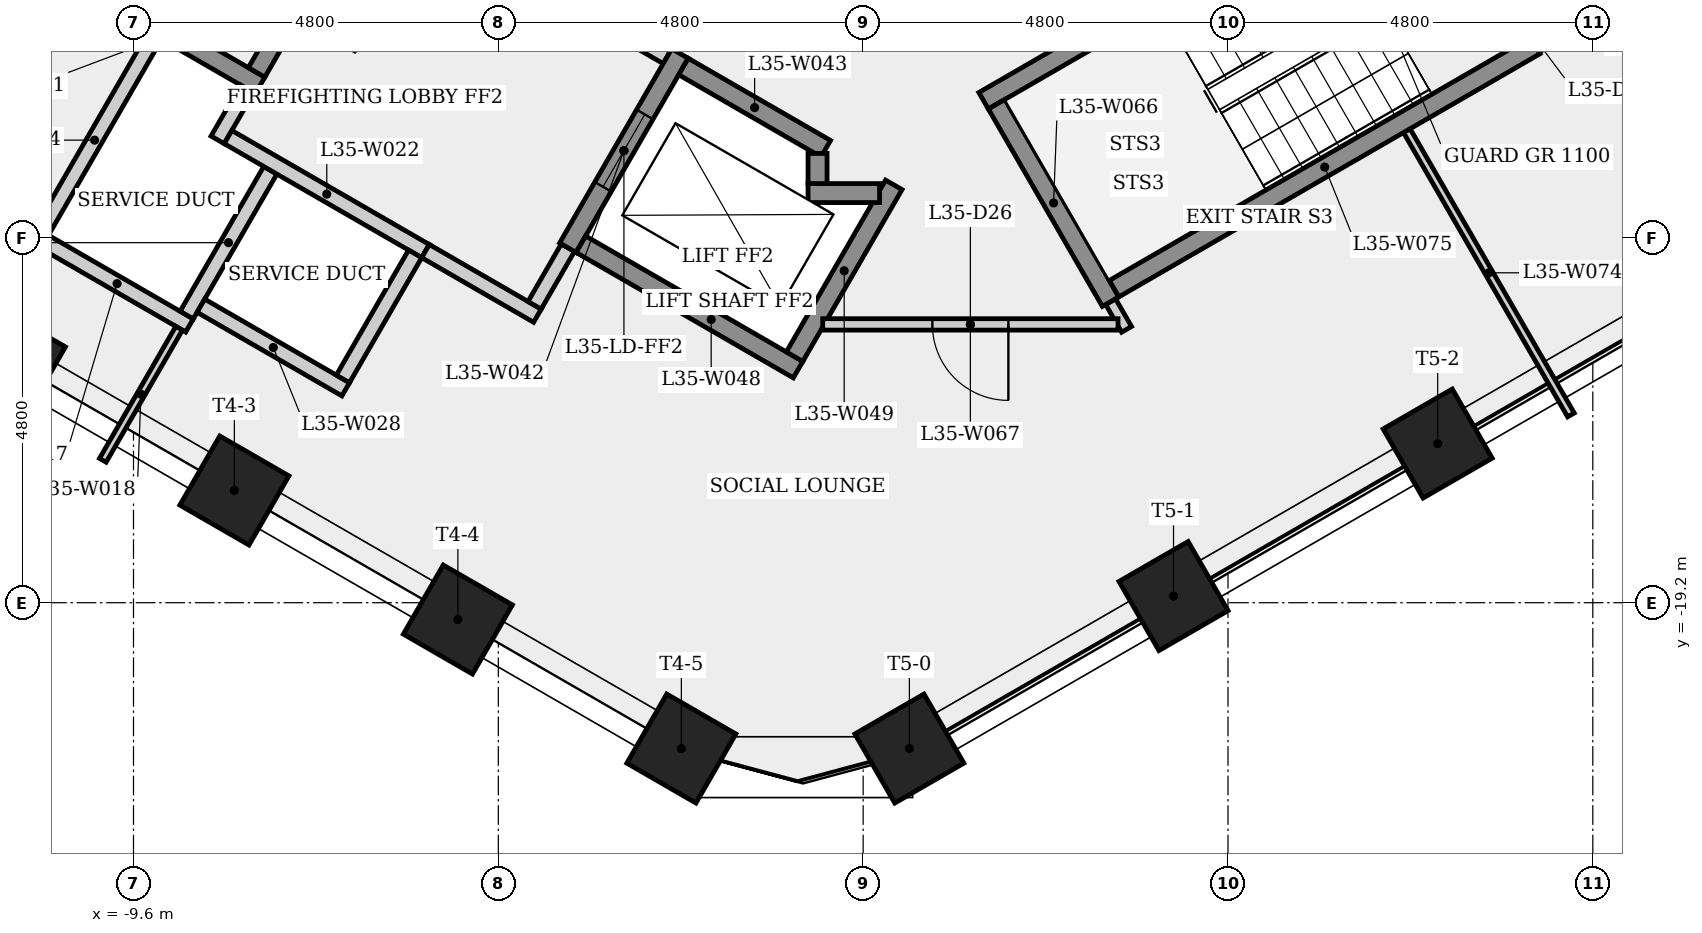
"""IFC4 building model, lengths in metres.
Left out: names, types, materials, properties, quantities, classifications, styles, units other than length and angle.
Written with IfcOpenShell. Run it as: python <this file> out.ifc"""

import sys

from ifc_helpers import new_model, si_unit, direction, frame, frame_2d, origin, origin_2d, place, context, subcontext, project, spatial, rectangle, extrude, element, fill, save


model = new_model("IFC4")
c1 = context("Model", 3, precision=1e-05, world=origin(), true_north=direction((0.0, 1.0)))
c2 = subcontext(c1, "Body", "Model", "MODEL_VIEW")
j1 = project(units=[si_unit("LENGTHUNIT", "METRE"), si_unit("PLANEANGLEUNIT", "RADIAN")], contexts=[c1])
p1 = place(None, origin())
s1 = spatial("IfcSite", under=j1, at=p1, CompositionType="ELEMENT")
p2 = place(p1, origin())
s2 = spatial("IfcBuilding", under=s1, at=p2, CompositionType="ELEMENT")
p3 = place(p2, frame((0.0, 0.0, 132.5)))
s3 = spatial("IfcBuildingStorey", under=s2, at=p3, CompositionType="ELEMENT", Elevation=132.5)
for number, where, z_axis, x_axis in (
    (1, (-11.213, -16.026, 0.0), (0.0, 0.0, 1.0), (-0.5, -0.866, 0.0)),
    (2, (-8.273, -17.724, 0.0), (0.0, 0.0, 1.0), (-0.5, -0.866, 0.0)),
    (3, (-5.332, -19.421, 0.0), (0.0, 0.0, 1.0), (-0.5, -0.866, 0.0)),
    (4, (-2.392, -21.119, 0.0), (0.0, 0.0, 1.0), (-0.5, -0.866, 0.0)),
    (5, (0.608, -21.119, 0.0), (0.0, 0.0, 1.0), (0.5, -0.866, 0.0)),
    (6, (4.083, -19.112, 0.0), (0.0, 0.0, 1.0), (0.5, -0.866, 0.0)),
    (7, (7.559, -17.106, 0.0), (0.0, 0.0, 1.0), (0.5, -0.866, 0.0)),
):
    element("IfcColumn", number, at=place(p3, frame(where, z_axis=z_axis, x_axis=x_axis)), inside=s3, PredefinedType="COLUMN", context=c2, shape_type="SweptSolid", body=[
        extrude(rectangle(XDim=1.05, YDim=1.05, at=origin_2d()), origin(), (0.0, 0.0, 1.0), 3.4),
    ])
p4 = place(p3, frame((-10.905, -14.489, 0.0), z_axis=(0.0, 0.0, 1.0), x_axis=(0.499959856469, 0.866048579423, 0.0)))
e8 = element("IfcWall", 8, at=p4, inside=s3, PredefinedType="PLUMBINGWALL", context=c2, shape_type="SweptSolid", body=[
    extrude(rectangle(XDim=3.175, YDim=0.2, at=frame_2d((1.587, 0.0))), origin(), (0.0, 0.0, 1.0), 3.0),
])
p5 = place(p3, frame((-13.477, -9.193, 0.0), z_axis=(0.0, 0.0, 1.0), x_axis=(0.866025499775, -0.499999833739, 0.0)))
e9 = element("IfcWall", 9, at=p5, inside=s3, PredefinedType="SHEAR", context=c2, shape_type="SweptSolid", body=[
    extrude(rectangle(XDim=6.4, YDim=0.25, at=frame_2d((3.2, 0.0))), origin(), (0.0, 0.0, 1.0), 3.0),
])
p6 = place(p3, frame((-8.863, -15.552, 0.0), z_axis=(0.0, 0.0, 1.0), x_axis=(-0.866035918664, 0.499981787252, 0.0)))
e10 = element("IfcWall", 10, at=p6, inside=s3, PredefinedType="PLUMBINGWALL", context=c2, shape_type="SweptSolid", body=[
    extrude(rectangle(XDim=2.2, YDim=0.2, at=frame_2d((1.1, 0.0))), origin(), (0.0, 0.0, 1.0), 3.0),
])
p7 = place(p3, frame((-9.0, -15.588, 0.0), z_axis=(0.0, 0.0, 1.0), x_axis=(-0.500038395149, -0.8660032352, 0.0)))
e11 = element("IfcWall", 11, at=p7, inside=s3, PredefinedType="PARTITIONING", context=c2, shape_type="SweptSolid", body=[
    extrude(rectangle(XDim=2.007, YDim=0.1, at=frame_2d((1.003, 0.0))), origin(), (0.0, 0.0, 1.0), 3.0),
])
p8 = place(p3, frame((-8.9, -15.415, 0.0), z_axis=(0.0, 0.0, 1.0), x_axis=(0.499946605688, 0.86605622881, 0.0)))
e12 = element("IfcWall", 12, at=p8, inside=s3, PredefinedType="PLUMBINGWALL", context=c2, shape_type="SweptSolid", body=[
    extrude(rectangle(XDim=2.2, YDim=0.2, at=frame_2d((1.1, 0.0))), origin(), (0.0, 0.0, 1.0), 3.0),
])
p9 = place(p3, frame((-8.493, -13.11, 0.0), z_axis=(0.0, 0.0, 1.0), x_axis=(0.500067724834, 0.865986299303, 0.0)))
e13 = element("IfcWall", 13, at=p9, inside=s3, PredefinedType="PLUMBINGWALL", context=c2, shape_type="SweptSolid", body=[
    extrude(rectangle(XDim=0.775, YDim=0.2, at=frame_2d((0.388, 0.0))), origin(), (0.0, 0.0, 1.0), 3.0),
])
p10 = place(p3, frame((-8.356, -13.073, 0.0), z_axis=(0.0, 0.0, 1.0), x_axis=(0.866031096941, -0.499990139034, 0.0)))
e14 = element("IfcWall", 14, at=p10, inside=s3, PredefinedType="PLUMBINGWALL", context=c2, shape_type="SweptSolid", body=[
    extrude(rectangle(XDim=3.0, YDim=0.2, at=frame_2d((1.5, 0.0))), origin(), (0.0, 0.0, 1.0), 3.0),
])
p11 = place(p3, frame((-6.808, -16.392, 0.0), z_axis=(0.0, 0.0, 1.0), x_axis=(-0.866008176907, 0.50002983664, 0.0)))
e15 = element("IfcWall", 15, at=p11, inside=s3, PredefinedType="PLUMBINGWALL", context=c2, shape_type="SweptSolid", body=[
    extrude(rectangle(XDim=2.2, YDim=0.2, at=frame_2d((1.1, 0.0))), origin(), (0.0, 0.0, 1.0), 3.0),
])
p12 = place(p3, frame((-6.605, -9.841, 0.0), z_axis=(0.0, 0.0, 1.0), x_axis=(-0.499996545922, -0.866027397988, 0.0)))
e16 = element("IfcWall", 16, at=p12, inside=s3, PredefinedType="SHEAR", context=c2, shape_type="SweptSolid", body=[
    extrude(rectangle(XDim=2.75, YDim=0.25, at=frame_2d((1.375, 0.0))), origin(), (0.0, 0.0, 1.0), 3.0),
])
p13 = place(p12, frame((0.875, 0.0, 0.0)))
e17 = element("IfcOpeningElement", 17, at=p13, cuts=e16, PredefinedType="OPENING", context=c2, shape_type="SweptSolid", body=[
    extrude(rectangle(XDim=1.0, YDim=2.1, at=frame_2d((0.5, 1.05))), frame((0.0, 0.135, 0.0), z_axis=(0.0, -1.0, 0.0), x_axis=(1.0, 0.0, 0.0)), (0.0, 0.0, 1.0), 0.27),
])
p14 = place(p3, frame((-6.435, -9.795, 0.0), z_axis=(0.0, 0.0, 1.0), x_axis=(0.866012907634, -0.500021643343, 0.0)))
e18 = element("IfcWall", 18, at=p14, inside=s3, PredefinedType="PARTITIONING", context=c2, shape_type="SweptSolid", body=[
    extrude(rectangle(XDim=4.45, YDim=0.2, at=frame_2d((2.225, 0.0))), origin(), (0.0, 0.0, 1.0), 3.0),
])
p15 = place(p14, frame((1.675, 0.0, 0.0)))
e19 = element("IfcOpeningElement", 19, at=p15, cuts=e18, PredefinedType="OPENING", context=c2, shape_type="SweptSolid", body=[
    extrude(rectangle(XDim=1.1, YDim=2.1, at=frame_2d((0.55, 1.05))), frame((0.0, 0.11, 0.0), z_axis=(0.0, -1.0, 0.0), x_axis=(1.0, 0.0, 0.0)), (0.0, 0.0, 1.0), 0.22),
])
p16 = place(p3, frame((-5.895, -14.61, 0.0), z_axis=(0.0, 0.0, 1.0), x_axis=(-0.500022797313, -0.86601224135, 0.0)))
e20 = element("IfcWall", 20, at=p16, inside=s3, PredefinedType="PLUMBINGWALL", context=c2, shape_type="SweptSolid", body=[
    extrude(rectangle(XDim=1.9, YDim=0.2, at=frame_2d((0.95, 0.0))), origin(), (0.0, 0.0, 1.0), 3.0),
])
p17 = place(p3, frame((-4.286, -15.423, 0.0), z_axis=(0.0, 0.0, 1.0), x_axis=(-0.866025371046, 0.500000056704, 0.0)))
e21 = element("IfcWall", 21, at=p17, inside=s3, PredefinedType="PARTITIONING", context=c2, shape_type="SweptSolid", body=[
    extrude(rectangle(XDim=1.7, YDim=0.2, at=frame_2d((0.85, 0.0))), origin(), (0.0, 0.0, 1.0), 3.0),
])
p18 = place(p3, frame((-3.885, -14.529, 0.0), z_axis=(0.0, 0.0, 1.0), x_axis=(-0.499859285417, -0.866106630146, 0.0)))
e22 = element("IfcWall", 22, at=p18, inside=s3, PredefinedType="PARTITIONING", context=c2, shape_type="SweptSolid", body=[
    extrude(rectangle(XDim=0.875, YDim=0.2, at=frame_2d((0.438, 0.0))), origin(), (0.0, 0.0, 1.0), 3.0),
])
p19 = place(p3, frame((-2.41, -11.974, 0.0), z_axis=(0.0, 0.0, 1.0), x_axis=(-0.500001826776, -0.866024349092, 0.0)))
e23 = element("IfcWall", 23, at=p19, inside=s3, PredefinedType="SHEAR", context=c2, shape_type="SweptSolid", body=[
    extrude(rectangle(XDim=2.95, YDim=0.25, at=frame_2d((1.475, 0.0))), origin(), (0.0, 0.0, 1.0), 3.0),
])
p20 = place(p19, frame((0.925, 0.0, 0.0)))
e24 = element("IfcOpeningElement", 24, at=p20, cuts=e23, PredefinedType="OPENING", context=c2, shape_type="SweptSolid", body=[
    extrude(rectangle(XDim=1.1, YDim=2.1, at=frame_2d((0.55, 1.05))), frame((0.0, 0.135, 0.0), z_axis=(0.0, -1.0, 0.0), x_axis=(1.0, 0.0, 0.0)), (0.0, 0.0, 1.0), 0.27),
])
p21 = place(p3, frame((-2.364, -12.145, 0.0), z_axis=(0.0, 0.0, 1.0), x_axis=(0.86603892542, -0.499976579108, 0.0)))
e25 = element("IfcWall", 25, at=p21, inside=s3, PredefinedType="SHEAR", context=c2, shape_type="SweptSolid", body=[
    extrude(rectangle(XDim=2.162, YDim=0.25, at=frame_2d((1.081, 0.0))), origin(), (0.0, 0.0, 1.0), 3.0),
])
p22 = place(p3, frame((-0.856, -16.133, 0.0), z_axis=(0.0, 0.0, 1.0), x_axis=(-0.866021716278, 0.500006386895, 0.0)))
e26 = element("IfcWall", 26, at=p22, inside=s3, PredefinedType="SHEAR", context=c2, shape_type="SweptSolid", body=[
    extrude(rectangle(XDim=3.3, YDim=0.25, at=frame_2d((1.65, 0.0))), origin(), (0.0, 0.0, 1.0), 3.0),
])
p23 = place(p3, frame((-0.902, -15.962, 0.0), z_axis=(0.0, 0.0, 1.0), x_axis=(0.499981517636, 0.866036074319, 0.0)))
e27 = element("IfcWall", 27, at=p23, inside=s3, PredefinedType="SHEAR", context=c2, shape_type="SweptSolid", body=[
    extrude(rectangle(XDim=2.61, YDim=0.25, at=frame_2d((1.305, 0.0))), origin(), (0.0, 0.0, 1.0), 3.0),
])
p24 = place(p3, frame((-0.725, -13.81, 0.0), z_axis=(0.0, 0.0, 1.0), x_axis=(1.0, 0.0, 0.0)))
e28 = element("IfcWall", 28, at=p24, inside=s3, PredefinedType="SHEAR", context=c2, shape_type="SweptSolid", body=[
    extrude(rectangle(XDim=0.941, YDim=0.25, at=frame_2d((0.47, 0.0))), origin(), (0.0, 0.0, 1.0), 3.4),
])
p25 = place(p3, frame((-0.6, -13.289, 0.0), z_axis=(0.0, 0.0, 1.0), x_axis=(0.0, -1.0, 0.0)))
e29 = element("IfcWall", 29, at=p25, inside=s3, PredefinedType="SHEAR", context=c2, shape_type="SweptSolid", body=[
    extrude(rectangle(XDim=0.396, YDim=0.25, at=frame_2d((0.198, 0.0))), origin(), (0.0, 0.0, 1.0), 3.4),
])
p26 = place(p3, frame((1.585, -12.595, 0.0), z_axis=(0.0, 0.0, 1.0), x_axis=(0.866036417653, 0.499980922934, 0.0)))
e30 = element("IfcWall", 30, at=p26, inside=s3, PredefinedType="SHEAR", context=c2, shape_type="SweptSolid", body=[
    extrude(rectangle(XDim=6.65, YDim=0.25, at=frame_2d((3.325, 0.0))), origin(), (0.0, 0.0, 1.0), 3.0),
])
p27 = place(p26, frame((5.275, 0.0, 0.0)))
e31 = element("IfcOpeningElement", 31, at=p27, cuts=e30, PredefinedType="OPENING", context=c2, shape_type="SweptSolid", body=[
    extrude(rectangle(XDim=1.0, YDim=2.1, at=frame_2d((0.5, 1.05))), frame((0.0, 0.135, 0.0), z_axis=(0.0, -1.0, 0.0), x_axis=(1.0, 0.0, 0.0)), (0.0, 0.0, 1.0), 0.27),
])
p28 = place(p3, frame((3.256, -15.239, 0.0), z_axis=(0.0, 0.0, 1.0), x_axis=(0.499822960955, -0.8661275932, 0.0)))
e32 = element("IfcWall", 32, at=p28, inside=s3, PredefinedType="PARTITIONING", context=c2, shape_type="SweptSolid", body=[
    extrude(rectangle(XDim=0.421, YDim=0.15, at=frame_2d((0.21, 0.0))), origin(), (0.0, 0.0, 1.0), 3.0),
])
p29 = place(p3, frame((3.256, -15.239, 0.0), z_axis=(0.0, 0.0, 1.0), x_axis=(-0.50002537861, 0.866010750942, 0.0)))
e33 = element("IfcWall", 33, at=p29, inside=s3, PredefinedType="SHEAR", context=c2, shape_type="SweptSolid", body=[
    extrude(rectangle(XDim=3.0, YDim=0.25, at=frame_2d((1.5, 0.0))), origin(), (0.0, 0.0, 1.0), 3.0),
])
p30 = place(p3, frame((3.353, -15.538, 0.0), z_axis=(0.0, 0.0, 1.0), x_axis=(-1.0, 0.0, 0.0)))
e34 = element("IfcWall", 34, at=p30, inside=s3, PredefinedType="PARTITIONING", context=c2, shape_type="SweptSolid", body=[
    extrude(rectangle(XDim=3.885, YDim=0.15, at=frame_2d((1.943, 0.0))), origin(), (0.0, 0.0, 1.0), 3.0),
])
p31 = place(p30, frame((1.443, 0.0, 0.0)))
e35 = element("IfcOpeningElement", 35, at=p31, cuts=e34, PredefinedType="OPENING", context=c2, shape_type="SweptSolid", body=[
    extrude(rectangle(XDim=1.0, YDim=2.1, at=frame_2d((0.5, 1.05))), frame((0.0, 0.085, 0.0), z_axis=(0.0, -1.0, 0.0), x_axis=(1.0, 0.0, 0.0)), (0.0, 0.0, 1.0), 0.17),
])
p32 = place(p3, frame((7.153, -12.989, 0.0), z_axis=(0.0, 0.0, 1.0), x_axis=(0.499993182398, -0.866029339893, 0.0)))
e36 = element("IfcWall", 36, at=p32, inside=s3, PredefinedType="PARTITIONING", context=c2, shape_type="SweptSolid", body=[
    extrude(rectangle(XDim=4.319, YDim=0.1, at=frame_2d((2.16, 0.0))), origin(), (0.0, 0.0, 1.0), 3.0),
])
p33 = place(p3, frame((3.301, -15.068, 0.0), z_axis=(0.0, 0.0, 1.0), x_axis=(0.866035036182, 0.499983315828, 0.0)))
e37 = element("IfcWall", 37, at=p33, inside=s3, PredefinedType="SHEAR", context=c2, shape_type="SweptSolid", body=[
    extrude(rectangle(XDim=6.4, YDim=0.25, at=frame_2d((3.2, 0.0))), origin(), (0.0, 0.0, 1.0), 3.0),
])
p34 = place(p3, frame((10.901, -10.681, 0.0), z_axis=(0.0, 0.0, 1.0), x_axis=(-0.866007538022, -0.500030943131, 0.0)))
e38 = element("IfcWall", 38, at=p34, inside=s3, PredefinedType="PARTITIONING", context=c2, shape_type="SweptSolid", body=[
    extrude(rectangle(XDim=2.375, YDim=0.2, at=frame_2d((1.188, 0.0))), origin(), (0.0, 0.0, 1.0), 3.0),
])
p35 = place(p20, origin())
e39 = element("IfcDoor", 39, at=p35, inside=s3, OperationType="SLIDING_TO_LEFT", PredefinedType="DOOR", context=c2, shape_type="SweptSolid", body=[
    extrude(rectangle(XDim=1.1, YDim=2.1, at=frame_2d((0.55, 1.05))), frame((0.0, 0.025, 0.0), z_axis=(0.0, -1.0, 0.0), x_axis=(1.0, 0.0, 0.0)), (0.0, 0.0, 1.0), 0.05),
])
fill(e24, e39)
p36 = place(p31, origin())
e40 = element("IfcDoor", 40, at=p36, inside=s3, OperationType="SINGLE_SWING_LEFT", PredefinedType="DOOR", context=c2, shape_type="SweptSolid", body=[
    extrude(rectangle(XDim=1.0, YDim=2.1, at=frame_2d((0.5, 1.05))), frame((0.0, 0.025, 0.0), z_axis=(0.0, -1.0, 0.0), x_axis=(1.0, 0.0, 0.0)), (0.0, 0.0, 1.0), 0.05),
])
fill(e35, e40)
save(model, sys.argv[1])
